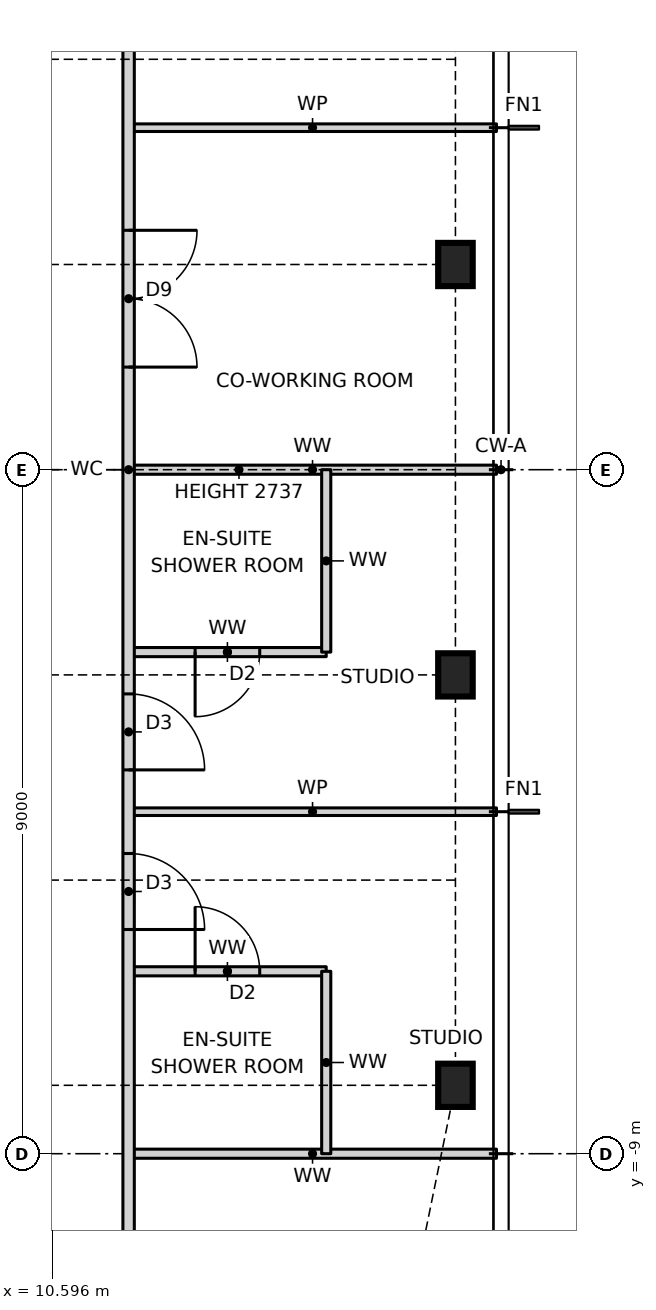
"""IFC4 building model, lengths in metres.
Left out: names, types, materials, properties, quantities, classifications, styles, units other than length and angle.
Written with IfcOpenShell. Run it as: python <this file> out.ifc"""

import sys

from ifc_helpers import new_model, si_unit, direction, frame, frame_2d, origin, origin_2d, place, context, subcontext, project, spatial, rectangle, i_section, extrude, element, fill, save


model = new_model("IFC4")
c1 = context("Model", 3, precision=1e-05, world=origin(), true_north=direction((0.0, 1.0)))
c2 = subcontext(c1, "Body", "Model", "MODEL_VIEW")
j1 = project(units=[si_unit("LENGTHUNIT", "METRE"), si_unit("PLANEANGLEUNIT", "RADIAN")], contexts=[c1])
p1 = place(None, origin())
s1 = spatial("IfcSite", under=j1, at=p1, CompositionType="ELEMENT")
p2 = place(p1, origin())
s2 = spatial("IfcBuilding", under=s1, at=p2, CompositionType="ELEMENT")
p3 = place(p2, frame((0.0, 0.0, 257.0)))
s3 = spatial("IfcBuildingStorey", under=s2, at=p3, CompositionType="ELEMENT", Elevation=257.0)
for number, where, z_axis, x_axis in (
    (1, (15.9, -8.1, 0.0), (0.0, 0.0, 1.0), (1.0, 0.0, 0.0)),
    (2, (15.9, -2.7, 0.0), (0.0, 0.0, 1.0), (1.0, 0.0, 0.0)),
    (3, (15.9, 2.7, 0.0), (0.0, 0.0, 1.0), (1.0, 0.0, 0.0)),
):
    element("IfcColumn", number, at=place(p3, frame(where, z_axis=z_axis, x_axis=x_axis)), inside=s3, PredefinedType="COLUMN", context=c2, shape_type="SweptSolid", body=[
        extrude(i_section(OverallWidth=0.455, OverallDepth=0.569, WebThickness=0.078, FlangeThickness=0.125, at=origin_2d()), origin(), (0.0, 0.0, 1.0), 3.5),
    ])
p4 = place(p3, frame((11.6, -9.0, 0.0), z_axis=(0.0, 0.0, 1.0), x_axis=(1.0, 0.0, 0.0)))
e4 = element("IfcWall", 4, at=p4, inside=s3, PredefinedType="PARTITIONING", context=c2, shape_type="SweptSolid", body=[
    extrude(rectangle(XDim=4.84, YDim=0.12, at=frame_2d((2.42, 0.0))), origin(), (0.0, 0.0, 1.0), 3.27),
])
p5 = place(p3, frame((11.6, -6.6, 0.0), z_axis=(0.0, 0.0, 1.0), x_axis=(1.0, 0.0, 0.0)))
e5 = element("IfcWall", 5, at=p5, inside=s3, PredefinedType="PARTITIONING", context=c2, shape_type="SweptSolid", body=[
    extrude(rectangle(XDim=2.6, YDim=0.12, at=frame_2d((1.3, 0.0))), origin(), (0.0, 0.0, 1.0), 3.27),
])
p6 = place(p5, frame((0.875, 0.0, 0.0)))
e6 = element("IfcOpeningElement", 6, at=p6, cuts=e5, PredefinedType="OPENING", context=c2, shape_type="SweptSolid", body=[
    extrude(rectangle(XDim=0.85, YDim=2.1, at=frame_2d((0.425, 1.05))), frame((0.0, 0.07, 0.0), z_axis=(0.0, -1.0, 0.0), x_axis=(1.0, 0.0, 0.0)), (0.0, 0.0, 1.0), 0.14),
])
p7 = place(p3, frame((11.6, -4.5, 0.0), z_axis=(0.0, 0.0, 1.0), x_axis=(1.0, 0.0, 0.0)))
e7 = element("IfcWall", 7, at=p7, inside=s3, PredefinedType="PARTITIONING", context=c2, shape_type="SweptSolid", body=[
    extrude(rectangle(XDim=4.84, YDim=0.1, at=frame_2d((2.42, 0.0))), origin(), (0.0, 0.0, 1.0), 3.27),
])
p8 = place(p3, frame((11.6, -2.4, 0.0), z_axis=(0.0, 0.0, 1.0), x_axis=(1.0, 0.0, 0.0)))
e8 = element("IfcWall", 8, at=p8, inside=s3, PredefinedType="PARTITIONING", context=c2, shape_type="SweptSolid", body=[
    extrude(rectangle(XDim=2.6, YDim=0.12, at=frame_2d((1.3, 0.0))), origin(), (0.0, 0.0, 1.0), 3.27),
])
p9 = place(p8, frame((0.875, 0.0, 0.0)))
e9 = element("IfcOpeningElement", 9, at=p9, cuts=e8, PredefinedType="OPENING", context=c2, shape_type="SweptSolid", body=[
    extrude(rectangle(XDim=0.85, YDim=2.1, at=frame_2d((0.425, 1.05))), frame((0.0, 0.07, 0.0), z_axis=(0.0, -1.0, 0.0), x_axis=(1.0, 0.0, 0.0)), (0.0, 0.0, 1.0), 0.14),
])
p10 = place(p3, frame((11.6, 0.0, 0.0), z_axis=(0.0, 0.0, 1.0), x_axis=(1.0, 0.0, 0.0)))
e10 = element("IfcWall", 10, at=p10, inside=s3, PredefinedType="PARTITIONING", context=c2, shape_type="SweptSolid", body=[
    extrude(rectangle(XDim=4.84, YDim=0.12, at=frame_2d((2.42, 0.0))), origin(), (0.0, 0.0, 1.0), 2.737),
])
p11 = place(p3, frame((11.6, 4.5, 0.0), z_axis=(0.0, 0.0, 1.0), x_axis=(1.0, 0.0, 0.0)))
e11 = element("IfcWall", 11, at=p11, inside=s3, PredefinedType="PARTITIONING", context=c2, shape_type="SweptSolid", body=[
    extrude(rectangle(XDim=4.84, YDim=0.1, at=frame_2d((2.42, 0.0))), origin(), (0.0, 0.0, 1.0), 3.27),
])
for number, where, z_axis, x_axis in (
    (12, (14.2, -9.0, 0.0), (0.0, 0.0, 1.0), (0.0, 1.0, 0.0)),
    (13, (14.2, -2.4, 0.0), (0.0, 0.0, 1.0), (0.0, 1.0, 0.0)),
):
    element("IfcWall", number, at=place(p3, frame(where, z_axis=z_axis, x_axis=x_axis)), inside=s3, PredefinedType="PARTITIONING", context=c2, shape_type="SweptSolid", body=[
        extrude(rectangle(XDim=2.4, YDim=0.12, at=frame_2d((1.2, 0.0))), origin(), (0.0, 0.0, 1.0), 3.27),
    ])
p12 = place(p3, frame((11.6, -11.6, 0.0), z_axis=(0.0, 0.0, 1.0), x_axis=(0.0, 1.0, 0.0)))
e14 = element("IfcWall", 14, at=p12, inside=s3, PredefinedType="PARTITIONING", context=c2, shape_type="SweptSolid", body=[
    extrude(rectangle(XDim=23.2, YDim=0.15, at=frame_2d((11.6, 0.0))), origin(), (0.0, 0.0, 1.0), 3.27),
])
p13 = place(p12, frame((5.55, 0.0, 0.0)))
e15 = element("IfcOpeningElement", 15, at=p13, cuts=e14, PredefinedType="OPENING", context=c2, shape_type="SweptSolid", body=[
    extrude(rectangle(XDim=1.0, YDim=2.1, at=frame_2d((0.5, 1.05))), frame((0.0, 0.085, 0.0), z_axis=(0.0, -1.0, 0.0), x_axis=(1.0, 0.0, 0.0)), (0.0, 0.0, 1.0), 0.17),
])
p14 = place(p12, frame((7.65, 0.0, 0.0)))
e16 = element("IfcOpeningElement", 16, at=p14, cuts=e14, PredefinedType="OPENING", context=c2, shape_type="SweptSolid", body=[
    extrude(rectangle(XDim=1.0, YDim=2.1, at=frame_2d((0.5, 1.05))), frame((0.0, 0.085, 0.0), z_axis=(0.0, -1.0, 0.0), x_axis=(1.0, 0.0, 0.0)), (0.0, 0.0, 1.0), 0.17),
])
p15 = place(p12, frame((12.95, 0.0, 0.0)))
e17 = element("IfcOpeningElement", 17, at=p15, cuts=e14, PredefinedType="OPENING", context=c2, shape_type="SweptSolid", body=[
    extrude(rectangle(XDim=1.8, YDim=2.1, at=frame_2d((0.9, 1.05))), frame((0.0, 0.085, 0.0), z_axis=(0.0, -1.0, 0.0), x_axis=(1.0, 0.0, 0.0)), (0.0, 0.0, 1.0), 0.17),
])
p16 = place(p12, frame((18.75, 0.0, 0.0)))
e18 = element("IfcOpeningElement", 18, at=p16, cuts=e14, PredefinedType="OPENING", context=c2, shape_type="SweptSolid", body=[
    extrude(rectangle(XDim=1.8, YDim=2.1, at=frame_2d((0.9, 1.05))), frame((0.0, 0.085, 0.0), z_axis=(0.0, -1.0, 0.0), x_axis=(1.0, 0.0, 0.0)), (0.0, 0.0, 1.0), 0.17),
])
p17 = place(p13, frame((1.0, 0.0, 0.0), z_axis=(0.0, 0.0, 1.0), x_axis=(-1.0, 0.0, 0.0)))
e19 = element("IfcDoor", 19, at=p17, inside=s3, OperationType="SINGLE_SWING_RIGHT", PredefinedType="DOOR", context=c2, shape_type="SweptSolid", body=[
    extrude(rectangle(XDim=1.0, YDim=2.1, at=frame_2d((0.5, 1.05))), frame((0.0, 0.025, 0.0), z_axis=(0.0, -1.0, 0.0), x_axis=(1.0, 0.0, 0.0)), (0.0, 0.0, 1.0), 0.05),
])
fill(e15, e19)
p18 = place(p6, origin())
e20 = element("IfcDoor", 20, at=p18, inside=s3, OperationType="SINGLE_SWING_LEFT", PredefinedType="DOOR", context=c2, shape_type="SweptSolid", body=[
    extrude(rectangle(XDim=0.85, YDim=2.1, at=frame_2d((0.425, 1.05))), frame((0.0, 0.025, 0.0), z_axis=(0.0, -1.0, 0.0), x_axis=(1.0, 0.0, 0.0)), (0.0, 0.0, 1.0), 0.05),
])
fill(e6, e20)
p19 = place(p14, frame((1.0, 0.0, 0.0), z_axis=(0.0, 0.0, 1.0), x_axis=(-1.0, 0.0, 0.0)))
e21 = element("IfcDoor", 21, at=p19, inside=s3, OperationType="SINGLE_SWING_RIGHT", PredefinedType="DOOR", context=c2, shape_type="SweptSolid", body=[
    extrude(rectangle(XDim=1.0, YDim=2.1, at=frame_2d((0.5, 1.05))), frame((0.0, 0.025, 0.0), z_axis=(0.0, -1.0, 0.0), x_axis=(1.0, 0.0, 0.0)), (0.0, 0.0, 1.0), 0.05),
])
fill(e16, e21)
p20 = place(p9, frame((0.85, 0.0, 0.0), z_axis=(0.0, 0.0, 1.0), x_axis=(-1.0, 0.0, 0.0)))
e22 = element("IfcDoor", 22, at=p20, inside=s3, OperationType="SINGLE_SWING_RIGHT", PredefinedType="DOOR", context=c2, shape_type="SweptSolid", body=[
    extrude(rectangle(XDim=0.85, YDim=2.1, at=frame_2d((0.425, 1.05))), frame((0.0, 0.025, 0.0), z_axis=(0.0, -1.0, 0.0), x_axis=(1.0, 0.0, 0.0)), (0.0, 0.0, 1.0), 0.05),
])
fill(e9, e22)
p21 = place(p15, frame((1.8, 0.0, 0.0), z_axis=(0.0, 0.0, 1.0), x_axis=(-1.0, 0.0, 0.0)))
e23 = element("IfcDoor", 23, at=p21, inside=s3, OperationType="DOUBLE_DOOR_SINGLE_SWING", PredefinedType="DOOR", context=c2, shape_type="SweptSolid", body=[
    extrude(rectangle(XDim=1.8, YDim=2.1, at=frame_2d((0.9, 1.05))), frame((0.0, 0.025, 0.0), z_axis=(0.0, -1.0, 0.0), x_axis=(1.0, 0.0, 0.0)), (0.0, 0.0, 1.0), 0.05),
])
fill(e17, e23)
save(model, sys.argv[1])
